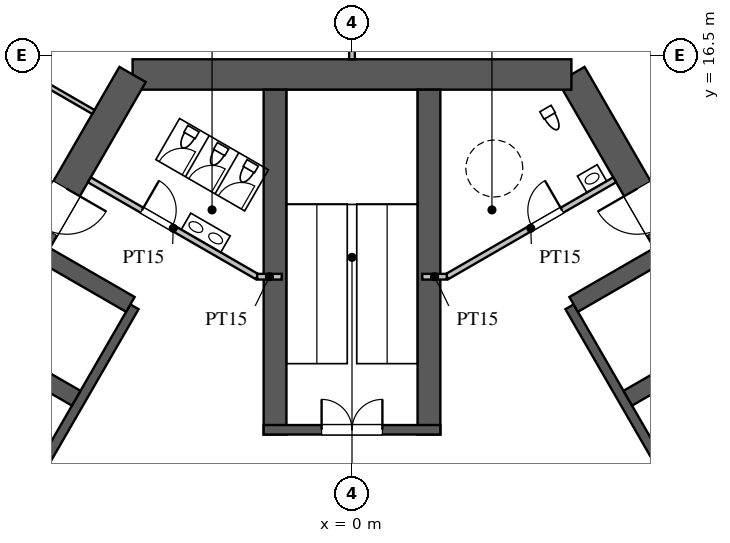
"""IFC4 building model, lengths in metres.
Left out: names, types, materials, properties, quantities, classifications, styles, units other than length and angle.
Written with IfcOpenShell. Run it as: python <this file> out.ifc"""

import sys

from ifc_helpers import new_model, si_unit, direction, frame, frame_2d, origin, place, context, subcontext, project, spatial, rectangle, extrude, element, fill, save


model = new_model("IFC4")
c1 = context("Model", 3, precision=1e-05, world=origin(), true_north=direction((0.0, 1.0)))
c2 = subcontext(c1, "Body", "Model", "MODEL_VIEW")
j1 = project(units=[si_unit("LENGTHUNIT", "METRE"), si_unit("PLANEANGLEUNIT", "RADIAN")], contexts=[c1])
p1 = place(None, origin())
s1 = spatial("IfcSite", under=j1, at=p1, CompositionType="ELEMENT")
p2 = place(p1, origin())
s2 = spatial("IfcBuilding", under=s1, at=p2, CompositionType="ELEMENT")
p3 = place(p2, frame((0.0, 0.0, 98.1)))
s3 = spatial("IfcBuildingStorey", under=s2, at=p3, CompositionType="ELEMENT", Elevation=98.1)
p4 = place(p3, frame((16.743, -3.0, 0.0), z_axis=(0.0, 0.0, 1.0), x_axis=(-0.500002442456, 0.866023993627, 0.0)))
e1 = element("IfcWall", 1, at=p4, inside=s3, PredefinedType="SHEAR", context=c2, shape_type="SweptSolid", body=[
    extrude(rectangle(XDim=21.939, YDim=0.8, at=frame_2d((10.97, 0.0))), origin(), (0.0, 0.0, 1.0), 5.0),
])
p5 = place(p4, frame((17.27, 0.0, 0.0)))
e2 = element("IfcOpeningElement", 2, at=p5, cuts=e1, PredefinedType="OPENING", context=c2, shape_type="SweptSolid", body=[
    extrude(rectangle(XDim=1.2, YDim=2.1, at=frame_2d((0.6, 1.05))), frame((0.0, 0.41, 0.0), z_axis=(0.0, -1.0, 0.0), x_axis=(1.0, 0.0, 0.0)), (0.0, 0.0, 1.0), 0.82),
])
p6 = place(p4, frame((3.47, 0.0, 0.0)))
e3 = element("IfcOpeningElement", 3, at=p6, cuts=e1, PredefinedType="OPENING", context=c2, shape_type="SweptSolid", body=[
    extrude(rectangle(XDim=1.2, YDim=2.1, at=frame_2d((0.6, 1.05))), frame((0.0, 0.41, 0.0), z_axis=(0.0, -1.0, 0.0), x_axis=(1.0, 0.0, 0.0)), (0.0, 0.0, 1.0), 0.82),
])
p7 = place(p3, frame((5.773, 16.0, 0.0), z_axis=(0.0, 0.0, 1.0), x_axis=(-1.0, 0.0, 0.0)))
e4 = element("IfcWall", 4, at=p7, inside=s3, PredefinedType="SHEAR", context=c2, shape_type="SweptSolid", body=[
    extrude(rectangle(XDim=11.547, YDim=0.8, at=frame_2d((5.773, 0.0))), origin(), (0.0, 0.0, 1.0), 5.0),
])
p8 = place(p3, frame((-5.773, 16.0, 0.0), z_axis=(0.0, 0.0, 1.0), x_axis=(-0.500002442456, -0.866023993627, 0.0)))
e5 = element("IfcWall", 5, at=p8, inside=s3, PredefinedType="SHEAR", context=c2, shape_type="SweptSolid", body=[
    extrude(rectangle(XDim=21.939, YDim=0.8, at=frame_2d((10.97, 0.0))), origin(), (0.0, 0.0, 1.0), 5.0),
])
p9 = place(p8, frame((17.27, 0.0, 0.0)))
e6 = element("IfcOpeningElement", 6, at=p9, cuts=e5, PredefinedType="OPENING", context=c2, shape_type="SweptSolid", body=[
    extrude(rectangle(XDim=1.2, YDim=2.1, at=frame_2d((0.6, 1.05))), frame((0.0, 0.41, 0.0), z_axis=(0.0, -1.0, 0.0), x_axis=(1.0, 0.0, 0.0)), (0.0, 0.0, 1.0), 0.82),
])
p10 = place(p8, frame((3.47, 0.0, 0.0)))
e7 = element("IfcOpeningElement", 7, at=p10, cuts=e5, PredefinedType="OPENING", context=c2, shape_type="SweptSolid", body=[
    extrude(rectangle(XDim=1.2, YDim=2.1, at=frame_2d((0.6, 1.05))), frame((0.0, 0.41, 0.0), z_axis=(0.0, -1.0, 0.0), x_axis=(1.0, 0.0, 0.0)), (0.0, 0.0, 1.0), 0.82),
])
p11 = place(p3, frame((11.424, 0.014, 0.0), z_axis=(0.0, 0.0, 1.0), x_axis=(-0.500001763848, 0.866024385424, 0.0)))
e8 = element("IfcWall", 8, at=p11, inside=s3, PredefinedType="SHEAR", context=c2, shape_type="SweptSolid", body=[
    extrude(rectangle(XDim=11.4, YDim=0.25, at=frame_2d((5.7, 0.0))), origin(), (0.0, 0.0, 1.0), 5.0),
])
p12 = place(p11, frame((0.875, 0.0, 0.0)))
e9 = element("IfcOpeningElement", 9, at=p12, cuts=e8, PredefinedType="OPENING", context=c2, shape_type="SweptSolid", body=[
    extrude(rectangle(XDim=1.1, YDim=2.2, at=frame_2d((0.55, 1.1))), frame((0.0, 0.135, 0.0), z_axis=(0.0, -1.0, 0.0), x_axis=(1.0, 0.0, 0.0)), (0.0, 0.0, 1.0), 0.27),
])
p13 = place(p11, frame((3.725, 0.0, 0.0)))
e10 = element("IfcOpeningElement", 10, at=p13, cuts=e8, PredefinedType="OPENING", context=c2, shape_type="SweptSolid", body=[
    extrude(rectangle(XDim=1.1, YDim=2.2, at=frame_2d((0.55, 1.1))), frame((0.0, 0.135, 0.0), z_axis=(0.0, -1.0, 0.0), x_axis=(1.0, 0.0, 0.0)), (0.0, 0.0, 1.0), 0.27),
])
p14 = place(p3, frame((7.257, 7.481, 0.0), z_axis=(0.0, 0.0, 1.0), x_axis=(0.866046643894, 0.499963209246, 0.0)))
e11 = element("IfcWall", 11, at=p14, inside=s3, PredefinedType="SHEAR", context=c2, shape_type="SweptSolid", body=[
    extrude(rectangle(XDim=2.575, YDim=0.45, at=frame_2d((1.288, 0.0))), origin(), (0.0, 0.0, 1.0), 5.0),
])
p15 = place(p3, frame((5.832, 9.949, 0.0), z_axis=(0.0, 0.0, 1.0), x_axis=(0.866029291668, 0.499993265928, 0.0)))
e12 = element("IfcWall", 12, at=p15, inside=s3, PredefinedType="SHEAR", context=c2, shape_type="SweptSolid", body=[
    extrude(rectangle(XDim=2.575, YDim=0.45, at=frame_2d((1.288, 0.0))), origin(), (0.0, 0.0, 1.0), 5.0),
])
p16 = place(p3, frame((-5.724, 9.886, 0.0), z_axis=(0.0, 0.0, 1.0), x_axis=(-0.500001763848, -0.866024385424, 0.0)))
e13 = element("IfcWall", 13, at=p16, inside=s3, PredefinedType="SHEAR", context=c2, shape_type="SweptSolid", body=[
    extrude(rectangle(XDim=11.4, YDim=0.25, at=frame_2d((5.7, 0.0))), origin(), (0.0, 0.0, 1.0), 5.0),
])
p17 = place(p16, frame((6.525, 0.0, 0.0)))
e14 = element("IfcOpeningElement", 14, at=p17, cuts=e13, PredefinedType="OPENING", context=c2, shape_type="SweptSolid", body=[
    extrude(rectangle(XDim=1.2, YDim=2.2, at=frame_2d((0.6, 1.1))), frame((0.0, 0.135, 0.0), z_axis=(0.0, -1.0, 0.0), x_axis=(1.0, 0.0, 0.0)), (0.0, 0.0, 1.0), 0.27),
])
p18 = place(p16, frame((9.375, 0.0, 0.0)))
e15 = element("IfcOpeningElement", 15, at=p18, cuts=e13, PredefinedType="OPENING", context=c2, shape_type="SweptSolid", body=[
    extrude(rectangle(XDim=1.2, YDim=2.2, at=frame_2d((0.6, 1.1))), frame((0.0, 0.135, 0.0), z_axis=(0.0, -1.0, 0.0), x_axis=(1.0, 0.0, 0.0)), (0.0, 0.0, 1.0), 0.27),
])
p19 = place(p3, frame((-5.832, 9.949, 0.0), z_axis=(0.0, 0.0, 1.0), x_axis=(-0.866029291668, 0.499993265928, 0.0)))
e16 = element("IfcWall", 16, at=p19, inside=s3, PredefinedType="SHEAR", context=c2, shape_type="SweptSolid", body=[
    extrude(rectangle(XDim=2.575, YDim=0.45, at=frame_2d((1.288, 0.0))), origin(), (0.0, 0.0, 1.0), 5.0),
])
p20 = place(p3, frame((-7.257, 7.481, 0.0), z_axis=(0.0, 0.0, 1.0), x_axis=(-0.866046643894, 0.499963209246, 0.0)))
e17 = element("IfcWall", 17, at=p20, inside=s3, PredefinedType="SHEAR", context=c2, shape_type="SweptSolid", body=[
    extrude(rectangle(XDim=2.575, YDim=0.45, at=frame_2d((1.288, 0.0))), origin(), (0.0, 0.0, 1.0), 5.0),
])
for number, where, z_axis, x_axis in (
    (18, (2.025, 6.525, 0.0), (0.0, 0.0, 1.0), (0.0, 1.0, 0.0)),
    (19, (-2.025, 6.525, 0.0), (0.0, 0.0, 1.0), (0.0, 1.0, 0.0)),
):
    element("IfcWall", number, at=place(p3, frame(where, z_axis=z_axis, x_axis=x_axis)), inside=s3, PredefinedType="SHEAR", context=c2, shape_type="SweptSolid", body=[
        extrude(rectangle(XDim=9.075, YDim=0.6, at=frame_2d((4.538, 0.0))), origin(), (0.0, 0.0, 1.0), 5.0),
    ])
p21 = place(p3, frame((2.325, 6.65, 0.0), z_axis=(0.0, 0.0, 1.0), x_axis=(-1.0, 0.0, 0.0)))
e20 = element("IfcWall", 20, at=p21, inside=s3, PredefinedType="SHEAR", context=c2, shape_type="SweptSolid", body=[
    extrude(rectangle(XDim=4.65, YDim=0.25, at=frame_2d((2.325, 0.0))), origin(), (0.0, 0.0, 1.0), 5.0),
])
p22 = place(p21, frame((1.525, 0.0, 0.0)))
e21 = element("IfcOpeningElement", 21, at=p22, cuts=e20, PredefinedType="OPENING", context=c2, shape_type="SweptSolid", body=[
    extrude(rectangle(XDim=1.6, YDim=2.1, at=frame_2d((0.8, 1.05))), frame((0.0, 0.135, 0.0), z_axis=(0.0, -1.0, 0.0), x_axis=(1.0, 0.0, 0.0)), (0.0, 0.0, 1.0), 0.27),
])
p23 = place(p3, frame((2.495, 10.678, 0.0), z_axis=(0.0, 0.0, 1.0), x_axis=(0.86602216432, 0.500005610874, 0.0)))
e22 = element("IfcWall", 22, at=p23, inside=s3, PredefinedType="PARTITIONING", context=c2, shape_type="SweptSolid", body=[
    extrude(rectangle(XDim=5.1, YDim=0.15, at=frame_2d((2.55, 0.0))), origin(), (0.0, 0.0, 1.0), 4.8),
])
p24 = place(p23, frame((2.6, 0.0, 0.0)))
e23 = element("IfcOpeningElement", 23, at=p24, cuts=e22, PredefinedType="OPENING", context=c2, shape_type="SweptSolid", body=[
    extrude(rectangle(XDim=0.9, YDim=2.1, at=frame_2d((0.45, 1.05))), frame((0.0, 0.085, 0.0), z_axis=(0.0, -1.0, 0.0), x_axis=(1.0, 0.0, 0.0)), (0.0, 0.0, 1.0), 0.17),
])
p25 = place(p3, frame((-2.495, 10.678, 0.0), z_axis=(0.0, 0.0, 1.0), x_axis=(-0.86602216432, 0.500005610874, 0.0)))
e24 = element("IfcWall", 24, at=p25, inside=s3, PredefinedType="PARTITIONING", context=c2, shape_type="SweptSolid", body=[
    extrude(rectangle(XDim=5.1, YDim=0.15, at=frame_2d((2.55, 0.0))), origin(), (0.0, 0.0, 1.0), 4.8),
])
p26 = place(p25, frame((2.6, 0.0, 0.0)))
e25 = element("IfcOpeningElement", 25, at=p26, cuts=e24, PredefinedType="OPENING", context=c2, shape_type="SweptSolid", body=[
    extrude(rectangle(XDim=0.9, YDim=2.1, at=frame_2d((0.45, 1.05))), frame((0.0, 0.085, 0.0), z_axis=(0.0, -1.0, 0.0), x_axis=(1.0, 0.0, 0.0)), (0.0, 0.0, 1.0), 0.17),
])
for number, where, z_axis, x_axis in (
    (26, (2.495, 10.678, 0.0), (0.0, 0.0, 1.0), (-1.0, 0.0, 0.0)),
    (27, (-2.495, 10.678, 0.0), (0.0, 0.0, 1.0), (1.0, 0.0, 0.0)),
):
    element("IfcWall", number, at=place(p3, frame(where, z_axis=z_axis, x_axis=x_axis)), inside=s3, PredefinedType="PARTITIONING", context=c2, shape_type="SweptSolid", body=[
        extrude(rectangle(XDim=0.645, YDim=0.15, at=frame_2d((0.323, 0.0))), origin(), (0.0, 0.0, 1.0), 4.8),
    ])
p27 = place(p3, frame((0.0, 16.4, 0.0), z_axis=(0.0, 0.0, 1.0), x_axis=(0.0, 1.0, 0.0)))
e28 = element("IfcWall", 28, at=p27, inside=s3, PredefinedType="PARTITIONING", context=c2, shape_type="SweptSolid", body=[
    extrude(rectangle(XDim=16.65, YDim=0.15, at=frame_2d((8.325, 0.0))), origin(), (0.0, 0.0, 1.0), 3.1),
])
p28 = place(p3, frame((-6.805, 15.014, 0.0), z_axis=(0.0, 0.0, 1.0), x_axis=(-0.866031096941, 0.499990139034, 0.0)))
e29 = element("IfcWall", 29, at=p28, inside=s3, PredefinedType="PARTITIONING", context=c2, shape_type="SweptSolid", body=[
    extrude(rectangle(XDim=4.5, YDim=0.12, at=frame_2d((2.25, 0.0))), origin(), (0.0, 0.0, 1.0), 3.6),
])
p29 = place(p24, origin())
e30 = element("IfcDoor", 30, at=p29, inside=s3, OperationType="SINGLE_SWING_RIGHT", PredefinedType="DOOR", context=c2, shape_type="SweptSolid", body=[
    extrude(rectangle(XDim=0.9, YDim=2.1, at=frame_2d((0.45, 1.05))), frame((0.0, 0.025, 0.0), z_axis=(0.0, -1.0, 0.0), x_axis=(1.0, 0.0, 0.0)), (0.0, 0.0, 1.0), 0.05),
])
fill(e23, e30)
p30 = place(p26, frame((0.9, 0.0, 0.0), z_axis=(0.0, 0.0, 1.0), x_axis=(-1.0, 0.0, 0.0)))
e31 = element("IfcDoor", 31, at=p30, inside=s3, OperationType="SINGLE_SWING_LEFT", PredefinedType="DOOR", context=c2, shape_type="SweptSolid", body=[
    extrude(rectangle(XDim=0.9, YDim=2.1, at=frame_2d((0.45, 1.05))), frame((0.0, 0.025, 0.0), z_axis=(0.0, -1.0, 0.0), x_axis=(1.0, 0.0, 0.0)), (0.0, 0.0, 1.0), 0.05),
])
fill(e25, e31)
p31 = place(p22, frame((1.6, 0.0, 0.0), z_axis=(0.0, 0.0, 1.0), x_axis=(-1.0, 0.0, 0.0)))
e32 = element("IfcDoor", 32, at=p31, inside=s3, OperationType="DOUBLE_DOOR_SINGLE_SWING", PredefinedType="DOOR", context=c2, shape_type="SweptSolid", body=[
    extrude(rectangle(XDim=1.6, YDim=2.1, at=frame_2d((0.8, 1.05))), frame((0.0, 0.025, 0.0), z_axis=(0.0, -1.0, 0.0), x_axis=(1.0, 0.0, 0.0)), (0.0, 0.0, 1.0), 0.05),
])
fill(e21, e32)
p32 = place(p5, origin())
e33 = element("IfcDoor", 33, at=p32, inside=s3, OperationType="SINGLE_SWING_RIGHT", PredefinedType="DOOR", context=c2, shape_type="SweptSolid", body=[
    extrude(rectangle(XDim=1.2, YDim=2.1, at=frame_2d((0.6, 1.05))), frame((0.0, 0.025, 0.0), z_axis=(0.0, -1.0, 0.0), x_axis=(1.0, 0.0, 0.0)), (0.0, 0.0, 1.0), 0.05),
])
fill(e2, e33)
p33 = place(p10, origin())
e34 = element("IfcDoor", 34, at=p33, inside=s3, OperationType="SINGLE_SWING_LEFT", PredefinedType="DOOR", context=c2, shape_type="SweptSolid", body=[
    extrude(rectangle(XDim=1.2, YDim=2.1, at=frame_2d((0.6, 1.05))), frame((0.0, 0.025, 0.0), z_axis=(0.0, -1.0, 0.0), x_axis=(1.0, 0.0, 0.0)), (0.0, 0.0, 1.0), 0.05),
])
fill(e7, e34)
save(model, sys.argv[1])
